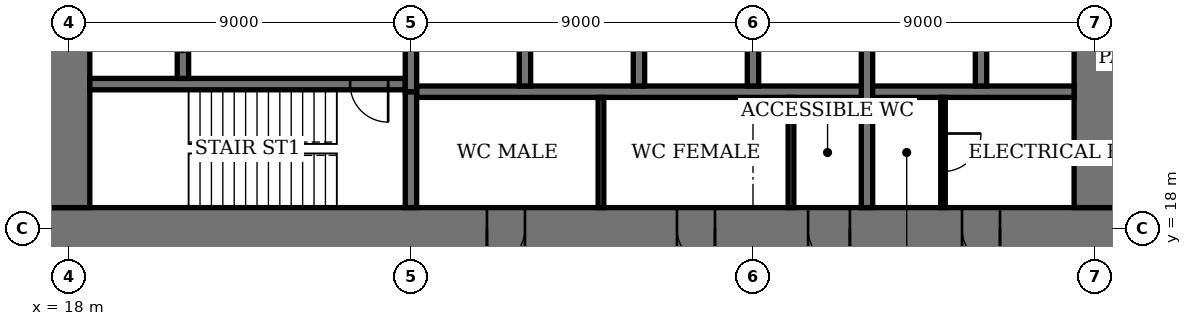
"""IFC4 building model, lengths in metres.
Left out: names, types, materials, properties, quantities, classifications, styles, units other than length and angle.
Written with IfcOpenShell. Run it as: python <this file> out.ifc"""

import sys

from ifc_helpers import new_model, si_unit, direction, frame, frame_2d, origin, place, context, subcontext, project, spatial, rectangle, extrude, element, fill, save


model = new_model("IFC4")
c1 = context("Model", 3, precision=1e-05, world=origin(), true_north=direction((0.0, 1.0)))
c2 = subcontext(c1, "Body", "Model", "MODEL_VIEW")
j1 = project(units=[si_unit("LENGTHUNIT", "METRE"), si_unit("PLANEANGLEUNIT", "RADIAN")], contexts=[c1])
p1 = place(None, origin())
s1 = spatial("IfcSite", under=j1, at=p1, CompositionType="ELEMENT")
p2 = place(p1, origin())
s2 = spatial("IfcBuilding", under=s1, at=p2, CompositionType="ELEMENT")
p3 = place(p2, frame((0.0, 0.0, 295.4)))
s3 = spatial("IfcBuildingStorey", under=s2, at=p3, CompositionType="ELEMENT", Elevation=295.4)
p4 = place(p3, frame((17.45, 18.0, 0.0), z_axis=(0.0, 0.0, 1.0), x_axis=(1.0, 0.0, 0.0)))
e1 = element("IfcWall", 1, at=p4, inside=s3, PredefinedType="SHEAR", context=c2, shape_type="SweptSolid", body=[
    extrude(rectangle(XDim=28.1, YDim=1.1, at=frame_2d((14.05, 0.0))), origin(), (0.0, 0.0, 1.0), 4.0),
])
p5 = place(p4, frame((11.55, 0.0, 0.0)))
e2 = element("IfcOpeningElement", 2, at=p5, cuts=e1, PredefinedType="OPENING", context=c2, shape_type="SweptSolid", body=[
    extrude(rectangle(XDim=1.0, YDim=2.4, at=frame_2d((0.5, 1.2))), frame((0.0, 0.56, 0.0), z_axis=(0.0, -1.0, 0.0), x_axis=(1.0, 0.0, 0.0)), (0.0, 0.0, 1.0), 1.12),
])
p6 = place(p4, frame((16.55, 0.0, 0.0)))
e3 = element("IfcOpeningElement", 3, at=p6, cuts=e1, PredefinedType="OPENING", context=c2, shape_type="SweptSolid", body=[
    extrude(rectangle(XDim=1.0, YDim=2.4, at=frame_2d((0.5, 1.2))), frame((0.0, 0.56, 0.0), z_axis=(0.0, -1.0, 0.0), x_axis=(1.0, 0.0, 0.0)), (0.0, 0.0, 1.0), 1.12),
])
p7 = place(p4, frame((20.0, 0.0, 0.0)))
e4 = element("IfcOpeningElement", 4, at=p7, cuts=e1, PredefinedType="OPENING", context=c2, shape_type="SweptSolid", body=[
    extrude(rectangle(XDim=1.1, YDim=2.4, at=frame_2d((0.55, 1.2))), frame((0.0, 0.56, 0.0), z_axis=(0.0, -1.0, 0.0), x_axis=(1.0, 0.0, 0.0)), (0.0, 0.0, 1.0), 1.12),
])
p8 = place(p4, frame((24.05, 0.0, 0.0)))
e5 = element("IfcOpeningElement", 5, at=p8, cuts=e1, PredefinedType="OPENING", context=c2, shape_type="SweptSolid", body=[
    extrude(rectangle(XDim=1.0, YDim=2.4, at=frame_2d((0.5, 1.2))), frame((0.0, 0.56, 0.0), z_axis=(0.0, -1.0, 0.0), x_axis=(1.0, 0.0, 0.0)), (0.0, 0.0, 1.0), 1.12),
])
p9 = place(p3, frame((18.0, 35.45, 0.0), z_axis=(0.0, 0.0, 1.0), x_axis=(0.0, -1.0, 0.0)))
e6 = element("IfcWall", 6, at=p9, inside=s3, PredefinedType="SHEAR", context=c2, shape_type="SweptSolid", body=[
    extrude(rectangle(XDim=16.9, YDim=1.1, at=frame_2d((8.45, 0.0))), origin(), (0.0, 0.0, 1.0), 4.0),
])
p10 = place(p9, frame((8.45, 0.0, 0.0)))
e7 = element("IfcOpeningElement", 7, at=p10, cuts=e6, PredefinedType="OPENING", context=c2, shape_type="SweptSolid", body=[
    extrude(rectangle(XDim=1.8, YDim=2.4, at=frame_2d((0.9, 1.2))), frame((0.0, 0.56, 0.0), z_axis=(0.0, -1.0, 0.0), x_axis=(1.0, 0.0, 0.0)), (0.0, 0.0, 1.0), 1.12),
])
p11 = place(p3, frame((45.0, 18.55, 0.0), z_axis=(0.0, 0.0, 1.0), x_axis=(0.0, 1.0, 0.0)))
e8 = element("IfcWall", 8, at=p11, inside=s3, PredefinedType="SHEAR", context=c2, shape_type="SweptSolid", body=[
    extrude(rectangle(XDim=16.9, YDim=1.1, at=frame_2d((8.45, 0.0))), origin(), (0.0, 0.0, 1.0), 4.0),
])
p12 = place(p11, frame((8.45, 0.0, 0.0)))
e9 = element("IfcOpeningElement", 9, at=p12, cuts=e8, PredefinedType="OPENING", context=c2, shape_type="SweptSolid", body=[
    extrude(rectangle(XDim=1.8, YDim=2.4, at=frame_2d((0.9, 1.2))), frame((0.0, 0.56, 0.0), z_axis=(0.0, -1.0, 0.0), x_axis=(1.0, 0.0, 0.0)), (0.0, 0.0, 1.0), 1.12),
])
p13 = place(p3, frame((18.55, 21.8, 0.0), z_axis=(0.0, 0.0, 1.0), x_axis=(1.0, 0.0, 0.0)))
e10 = element("IfcWall", 10, at=p13, inside=s3, PredefinedType="SHEAR", context=c2, shape_type="SweptSolid", body=[
    extrude(rectangle(XDim=8.3, YDim=0.3, at=frame_2d((4.15, 0.0))), origin(), (0.0, 0.0, 1.0), 4.0),
])
p14 = place(p13, frame((6.85, 0.0, 0.0)))
e11 = element("IfcOpeningElement", 11, at=p14, cuts=e10, PredefinedType="OPENING", context=c2, shape_type="SweptSolid", body=[
    extrude(rectangle(XDim=1.0, YDim=2.4, at=frame_2d((0.5, 1.2))), frame((0.0, 0.16, 0.0), z_axis=(0.0, -1.0, 0.0), x_axis=(1.0, 0.0, 0.0)), (0.0, 0.0, 1.0), 0.32),
])
p15 = place(p3, frame((27.0, 18.55, 0.0), z_axis=(0.0, 0.0, 1.0), x_axis=(0.0, 1.0, 0.0)))
e12 = element("IfcWall", 12, at=p15, inside=s3, PredefinedType="SHEAR", context=c2, shape_type="SweptSolid", body=[
    extrude(rectangle(XDim=3.05, YDim=0.3, at=frame_2d((1.525, 0.0))), origin(), (0.0, 0.0, 1.0), 4.0),
])
p16 = place(p3, frame((21.0, 21.95, 0.0), z_axis=(0.0, 0.0, 1.0), x_axis=(0.0, 1.0, 0.0)))
e13 = element("IfcWall", 13, at=p16, inside=s3, PredefinedType="SHEAR", context=c2, shape_type="SweptSolid", body=[
    extrude(rectangle(XDim=2.5, YDim=0.3, at=frame_2d((1.25, 0.0))), origin(), (0.0, 0.0, 1.0), 4.0),
])
p17 = place(p16, frame((0.7, 0.0, 0.0)))
e14 = element("IfcOpeningElement", 14, at=p17, cuts=e13, PredefinedType="OPENING", context=c2, shape_type="SweptSolid", body=[
    extrude(rectangle(XDim=1.1, YDim=2.4, at=frame_2d((0.55, 1.2))), frame((0.0, 0.16, 0.0), z_axis=(0.0, -1.0, 0.0), x_axis=(1.0, 0.0, 0.0)), (0.0, 0.0, 1.0), 0.32),
])
p18 = place(p3, frame((27.15, 21.6, 0.0), z_axis=(0.0, 0.0, 1.0), x_axis=(1.0, 0.0, 0.0)))
e15 = element("IfcWall", 15, at=p18, inside=s3, PredefinedType="SHEAR", context=c2, shape_type="SweptSolid", body=[
    extrude(rectangle(XDim=17.3, YDim=0.3, at=frame_2d((8.65, 0.0))), origin(), (0.0, 0.0, 1.0), 4.0),
])
for number, where, z_axis, x_axis in (
    (16, (30.0, 21.75, 0.0), (0.0, 0.0, 1.0), (0.0, 1.0, 0.0)),
    (17, (33.0, 21.75, 0.0), (0.0, 0.0, 1.0), (0.0, 1.0, 0.0)),
    (18, (36.0, 21.75, 0.0), (0.0, 0.0, 1.0), (0.0, 1.0, 0.0)),
):
    element("IfcWall", number, at=place(p3, frame(where, z_axis=z_axis, x_axis=x_axis)), inside=s3, PredefinedType="SHEAR", context=c2, shape_type="SweptSolid", body=[
        extrude(rectangle(XDim=2.7, YDim=0.3, at=frame_2d((1.35, 0.0))), origin(), (0.0, 0.0, 1.0), 4.0),
    ])
p19 = place(p3, frame((39.0, 18.55, 0.0), z_axis=(0.0, 0.0, 1.0), x_axis=(0.0, 1.0, 0.0)))
e19 = element("IfcWall", 19, at=p19, inside=s3, PredefinedType="SHEAR", context=c2, shape_type="SweptSolid", body=[
    extrude(rectangle(XDim=5.9, YDim=0.3, at=frame_2d((2.95, 0.0))), origin(), (0.0, 0.0, 1.0), 4.0),
])
p20 = place(p3, frame((42.0, 21.75, 0.0), z_axis=(0.0, 0.0, 1.0), x_axis=(0.0, 1.0, 0.0)))
e20 = element("IfcWall", 20, at=p20, inside=s3, PredefinedType="SHEAR", context=c2, shape_type="SweptSolid", body=[
    extrude(rectangle(XDim=2.7, YDim=0.3, at=frame_2d((1.35, 0.0))), origin(), (0.0, 0.0, 1.0), 4.0),
])
p21 = place(p3, frame((27.0, 21.6, 0.0), z_axis=(0.0, 0.0, 1.0), x_axis=(0.0, 1.0, 0.0)))
e21 = element("IfcWall", 21, at=p21, inside=s3, PredefinedType="SHEAR", context=c2, shape_type="SweptSolid", body=[
    extrude(rectangle(XDim=2.85, YDim=0.3, at=frame_2d((1.425, 0.0))), origin(), (0.0, 0.0, 1.0), 4.0),
])
for number, where, z_axis, x_axis in (
    (22, (32.0, 18.55, 0.0), (0.0, 0.0, 1.0), (0.0, 1.0, 0.0)),
    (23, (37.0, 18.55, 0.0), (0.0, 0.0, 1.0), (0.0, 1.0, 0.0)),
):
    element("IfcWall", number, at=place(p3, frame(where, z_axis=z_axis, x_axis=x_axis)), inside=s3, PredefinedType="PARTITIONING", context=c2, shape_type="SweptSolid", body=[
        extrude(rectangle(XDim=2.9, YDim=0.15, at=frame_2d((1.45, 0.0))), origin(), (0.0, 0.0, 1.0), 3.75),
    ])
p22 = place(p3, frame((41.0, 18.55, 0.0), z_axis=(0.0, 0.0, 1.0), x_axis=(0.0, 1.0, 0.0)))
e24 = element("IfcWall", 24, at=p22, inside=s3, PredefinedType="PARTITIONING", context=c2, shape_type="SweptSolid", body=[
    extrude(rectangle(XDim=2.9, YDim=0.12, at=frame_2d((1.45, 0.0))), origin(), (0.0, 0.0, 1.0), 3.75),
])
p23 = place(p22, frame((0.95, 0.0, 0.0)))
e25 = element("IfcOpeningElement", 25, at=p23, cuts=e24, PredefinedType="OPENING", context=c2, shape_type="SweptSolid", body=[
    extrude(rectangle(XDim=1.0, YDim=2.4, at=frame_2d((0.5, 1.2))), frame((0.0, 0.07, 0.0), z_axis=(0.0, -1.0, 0.0), x_axis=(1.0, 0.0, 0.0)), (0.0, 0.0, 1.0), 0.14),
])
p24 = place(p5, origin())
e26 = element("IfcDoor", 26, at=p24, inside=s3, OperationType="SINGLE_SWING_LEFT", PredefinedType="DOOR", context=c2, shape_type="SweptSolid", body=[
    extrude(rectangle(XDim=1.0, YDim=2.4, at=frame_2d((0.5, 1.2))), frame((0.0, 0.025, 0.0), z_axis=(0.0, -1.0, 0.0), x_axis=(1.0, 0.0, 0.0)), (0.0, 0.0, 1.0), 0.05),
    extrude(rectangle(XDim=0.04, YDim=2.4, at=frame_2d((0.02, 1.2))), frame((0.0, 0.4, 0.0), z_axis=(0.0, -1.0, 0.0), x_axis=(1.0, 0.0, 0.0)), (0.0, 0.0, 1.0), 0.8),
    extrude(rectangle(XDim=0.04, YDim=2.4, at=frame_2d((0.98, 1.2))), frame((0.0, 0.4, 0.0), z_axis=(0.0, -1.0, 0.0), x_axis=(1.0, 0.0, 0.0)), (0.0, 0.0, 1.0), 0.8),
    extrude(rectangle(XDim=1.0, YDim=0.04, at=frame_2d((0.5, 2.38))), frame((0.0, 0.4, 0.0), z_axis=(0.0, -1.0, 0.0), x_axis=(1.0, 0.0, 0.0)), (0.0, 0.0, 1.0), 0.8),
])
fill(e2, e26)
p25 = place(p6, origin())
e27 = element("IfcDoor", 27, at=p25, inside=s3, OperationType="SINGLE_SWING_RIGHT", PredefinedType="DOOR", context=c2, shape_type="SweptSolid", body=[
    extrude(rectangle(XDim=1.0, YDim=2.4, at=frame_2d((0.5, 1.2))), frame((0.0, 0.025, 0.0), z_axis=(0.0, -1.0, 0.0), x_axis=(1.0, 0.0, 0.0)), (0.0, 0.0, 1.0), 0.05),
    extrude(rectangle(XDim=0.04, YDim=2.4, at=frame_2d((0.02, 1.2))), frame((0.0, 0.4, 0.0), z_axis=(0.0, -1.0, 0.0), x_axis=(1.0, 0.0, 0.0)), (0.0, 0.0, 1.0), 0.8),
    extrude(rectangle(XDim=0.04, YDim=2.4, at=frame_2d((0.98, 1.2))), frame((0.0, 0.4, 0.0), z_axis=(0.0, -1.0, 0.0), x_axis=(1.0, 0.0, 0.0)), (0.0, 0.0, 1.0), 0.8),
    extrude(rectangle(XDim=1.0, YDim=0.04, at=frame_2d((0.5, 2.38))), frame((0.0, 0.4, 0.0), z_axis=(0.0, -1.0, 0.0), x_axis=(1.0, 0.0, 0.0)), (0.0, 0.0, 1.0), 0.8),
])
fill(e3, e27)
p26 = place(p7, origin())
e28 = element("IfcDoor", 28, at=p26, inside=s3, OperationType="SINGLE_SWING_RIGHT", PredefinedType="DOOR", context=c2, shape_type="SweptSolid", body=[
    extrude(rectangle(XDim=1.1, YDim=2.4, at=frame_2d((0.55, 1.2))), frame((0.0, 0.025, 0.0), z_axis=(0.0, -1.0, 0.0), x_axis=(1.0, 0.0, 0.0)), (0.0, 0.0, 1.0), 0.05),
    extrude(rectangle(XDim=0.04, YDim=2.4, at=frame_2d((0.02, 1.2))), frame((0.0, 0.44, 0.0), z_axis=(0.0, -1.0, 0.0), x_axis=(1.0, 0.0, 0.0)), (0.0, 0.0, 1.0), 0.88),
    extrude(rectangle(XDim=0.04, YDim=2.4, at=frame_2d((1.08, 1.2))), frame((0.0, 0.44, 0.0), z_axis=(0.0, -1.0, 0.0), x_axis=(1.0, 0.0, 0.0)), (0.0, 0.0, 1.0), 0.88),
    extrude(rectangle(XDim=1.1, YDim=0.04, at=frame_2d((0.55, 2.38))), frame((0.0, 0.44, 0.0), z_axis=(0.0, -1.0, 0.0), x_axis=(1.0, 0.0, 0.0)), (0.0, 0.0, 1.0), 0.88),
])
fill(e4, e28)
p27 = place(p8, origin())
e29 = element("IfcDoor", 29, at=p27, inside=s3, OperationType="SINGLE_SWING_RIGHT", PredefinedType="DOOR", context=c2, shape_type="SweptSolid", body=[
    extrude(rectangle(XDim=1.0, YDim=2.4, at=frame_2d((0.5, 1.2))), frame((0.0, 0.025, 0.0), z_axis=(0.0, -1.0, 0.0), x_axis=(1.0, 0.0, 0.0)), (0.0, 0.0, 1.0), 0.05),
    extrude(rectangle(XDim=0.04, YDim=2.4, at=frame_2d((0.02, 1.2))), frame((0.0, 0.4, 0.0), z_axis=(0.0, -1.0, 0.0), x_axis=(1.0, 0.0, 0.0)), (0.0, 0.0, 1.0), 0.8),
    extrude(rectangle(XDim=0.04, YDim=2.4, at=frame_2d((0.98, 1.2))), frame((0.0, 0.4, 0.0), z_axis=(0.0, -1.0, 0.0), x_axis=(1.0, 0.0, 0.0)), (0.0, 0.0, 1.0), 0.8),
    extrude(rectangle(XDim=1.0, YDim=0.04, at=frame_2d((0.5, 2.38))), frame((0.0, 0.4, 0.0), z_axis=(0.0, -1.0, 0.0), x_axis=(1.0, 0.0, 0.0)), (0.0, 0.0, 1.0), 0.8),
])
fill(e5, e29)
p28 = place(p14, origin())
e30 = element("IfcDoor", 30, at=p28, inside=s3, OperationType="SINGLE_SWING_RIGHT", PredefinedType="DOOR", context=c2, shape_type="SweptSolid", body=[
    extrude(rectangle(XDim=1.0, YDim=2.4, at=frame_2d((0.5, 1.2))), frame((0.0, 0.03, 0.0), z_axis=(0.0, -1.0, 0.0), x_axis=(1.0, 0.0, 0.0)), (0.0, 0.0, 1.0), 0.06),
])
fill(e11, e30)
p29 = place(p23, origin())
e31 = element("IfcDoor", 31, at=p29, inside=s3, OperationType="SINGLE_SWING_RIGHT", PredefinedType="DOOR", context=c2, shape_type="SweptSolid", body=[
    extrude(rectangle(XDim=1.0, YDim=2.4, at=frame_2d((0.5, 1.2))), frame((0.0, 0.03, 0.0), z_axis=(0.0, -1.0, 0.0), x_axis=(1.0, 0.0, 0.0)), (0.0, 0.0, 1.0), 0.06),
])
fill(e25, e31)
save(model, sys.argv[1])
